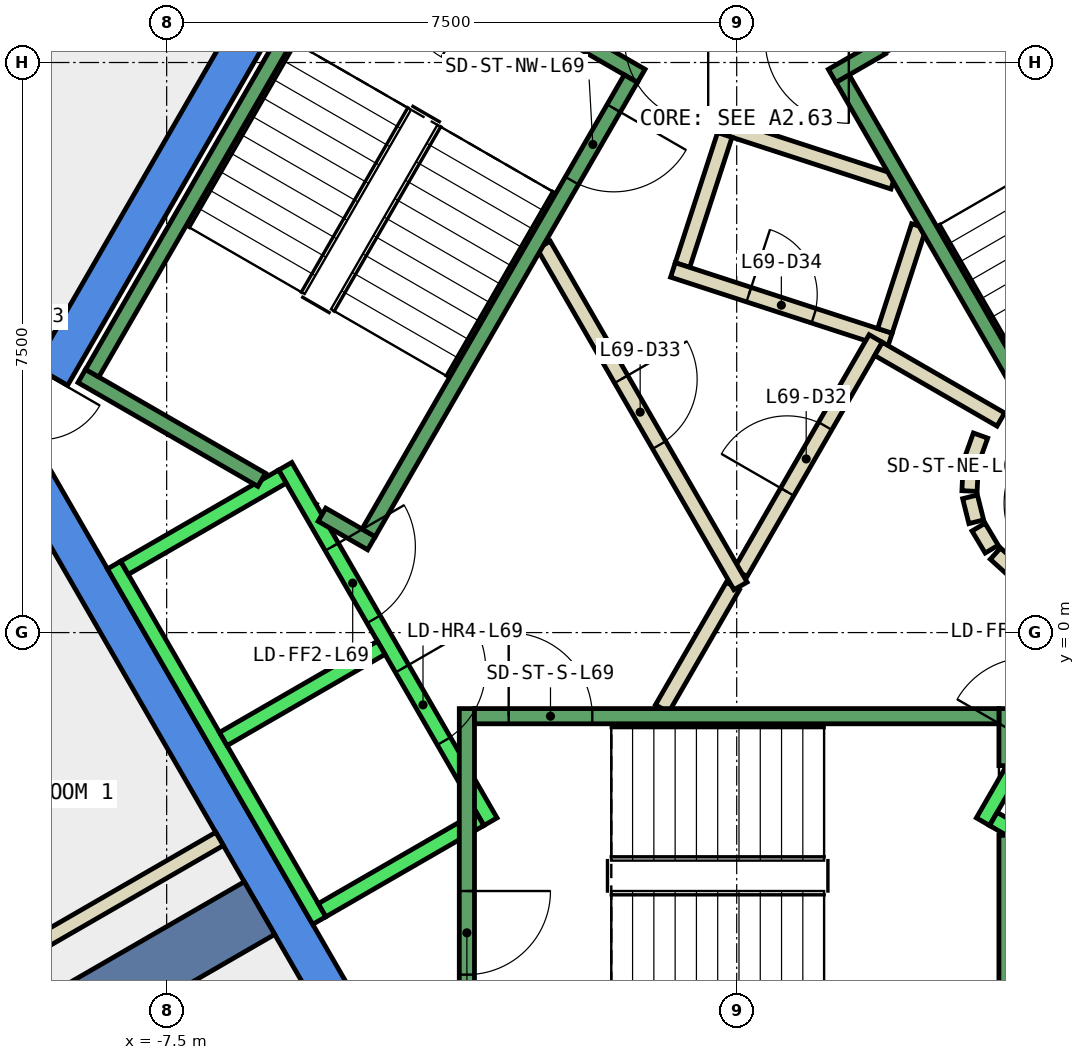
"""IFC4 building model, lengths in metres.
Left out: names, types, materials, properties, quantities, classifications, styles, units other than length and angle.
Written with IfcOpenShell. Run it as: python <this file> out.ifc"""

import sys

from ifc_helpers import new_model, si_unit, direction, frame, frame_2d, origin, place, context, subcontext, project, spatial, polyline, rectangle, outline, extrude, element, fill, save


model = new_model("IFC4")
c1 = context("Model", 3, precision=1e-05, world=origin(), true_north=direction((0.0, 1.0)))
c2 = subcontext(c1, "Body", "Model", "MODEL_VIEW")
j1 = project(units=[si_unit("LENGTHUNIT", "METRE"), si_unit("PLANEANGLEUNIT", "RADIAN")], contexts=[c1])
p1 = place(None, origin())
s1 = spatial("IfcSite", under=j1, at=p1, CompositionType="ELEMENT")
p2 = place(p1, origin())
s2 = spatial("IfcBuilding", under=s1, at=p2, CompositionType="ELEMENT")
p3 = place(p2, frame((0.0, 0.0, 297.2)))
s3 = spatial("IfcBuildingStorey", under=s2, at=p3, CompositionType="ELEMENT", Elevation=297.2)
p4 = place(p3, frame((0.0, 0.0, -0.34)))
e1 = element("IfcWall", 1, at=p4, inside=s3, PredefinedType="SHEAR", context=c2, shape_type="SweptSolid", body=[
    extrude(outline(polyline([(-9.236, 3.502), (-8.803, 3.253), (-4.619, 10.5), (-4.907, 11.0), (-9.236, 3.502)])), origin(), (0.0, 0.0, 1.0), 3.6),
])
p5 = place(p3, frame((0.0, 0.0, -0.34)))
e2 = element("IfcWall", 2, at=p5, inside=s3, PredefinedType="SHEAR", context=c2, shape_type="SweptSolid", body=[
    extrude(outline(polyline([(-9.815, 2.5), (-4.907, -6.0), (-4.619, -5.5), (-9.238, 2.5), (-9.815, 2.5)])), origin(), (0.0, 0.0, 1.0), 3.6),
])
p6 = place(p3, frame((-6.279, -3.625, -0.34), z_axis=(0.0, 0.0, 1.0), x_axis=(-0.866017533419, -0.500013631625, 0.0)))
e3 = element("IfcWall", 3, at=p6, inside=s3, PredefinedType="SHEAR", context=c2, shape_type="SweptSolid", body=[
    extrude(rectangle(XDim=9.0, YDim=0.8, at=frame_2d((4.5, 0.0))), origin(), (0.0, 0.0, 1.0), 3.6),
])
p7 = place(p3, frame((2.06, 5.931, 0.0), z_axis=(0.0, 0.0, 1.0), x_axis=(-0.95092855133, 0.309410552932, 0.0)))
e4 = element("IfcWall", 4, at=p7, inside=s3, PredefinedType="PARTITIONING", context=c2, shape_type="SweptSolid", body=[
    extrude(rectangle(XDim=2.399, YDim=0.2, at=frame_2d((1.199, 0.0))), origin(), (0.0, 0.0, 1.0), 3.26),
])
p8 = place(p3, frame((-0.157, 6.547, 0.0), z_axis=(0.0, 0.0, 1.0), x_axis=(-0.308813127339, -0.951122732555, 0.0)))
e5 = element("IfcWall", 5, at=p8, inside=s3, PredefinedType="PARTITIONING", context=c2, shape_type="SweptSolid", body=[
    extrude(rectangle(XDim=1.8, YDim=0.2, at=frame_2d((0.9, 0.0))), origin(), (0.0, 0.0, 1.0), 3.26),
])
p9 = place(p3, frame((-0.839, 4.771, 0.0), z_axis=(0.0, 0.0, 1.0), x_axis=(0.950961084355, -0.309310549515, 0.0)))
e6 = element("IfcWall", 6, at=p9, inside=s3, PredefinedType="PARTITIONING", context=c2, shape_type="SweptSolid", body=[
    extrude(rectangle(XDim=3.0, YDim=0.2, at=frame_2d((1.5, 0.0))), origin(), (0.0, 0.0, 1.0), 3.26),
])
p10 = place(p9, frame((1.05, 0.0, 0.0)))
e7 = element("IfcOpeningElement", 7, at=p10, cuts=e6, PredefinedType="OPENING", context=c2, shape_type="SweptSolid", body=[
    extrude(rectangle(XDim=0.9, YDim=2.1, at=frame_2d((0.45, 1.05))), frame((0.0, 0.11, 0.0), z_axis=(0.0, -1.0, 0.0), x_axis=(1.0, 0.0, 0.0)), (0.0, 0.0, 1.0), 0.22),
])
p11 = place(p3, frame((1.95, 3.97, 0.0), z_axis=(0.0, 0.0, 1.0), x_axis=(0.308583003896, 0.951197418892, 0.0)))
e8 = element("IfcWall", 8, at=p11, inside=s3, PredefinedType="PARTITIONING", context=c2, shape_type="SweptSolid", body=[
    extrude(rectangle(XDim=1.449, YDim=0.2, at=frame_2d((0.724, 0.0))), origin(), (0.0, 0.0, 1.0), 3.26),
])
p12 = place(p3, frame((-10.543, 6.174, 0.0), z_axis=(0.0, 0.0, 1.0), x_axis=(0.50008212199, 0.86597798544, 0.0)))
e9 = element("IfcWall", 9, at=p12, inside=s3, PredefinedType="PARTITIONING", context=c2, shape_type="SweptSolid", body=[
    extrude(rectangle(XDim=3.995, YDim=0.2, at=frame_2d((1.998, 0.0))), origin(), (0.0, 0.0, 1.0), 3.26),
])
p13 = place(p3, frame((-0.982, -1.0, 0.0), z_axis=(0.0, 0.0, 1.0), x_axis=(0.50024047865, 0.865886518847, 0.0)))
e10 = element("IfcWall", 10, at=p13, inside=s3, PredefinedType="PARTITIONING", context=c2, shape_type="SweptSolid", body=[
    extrude(rectangle(XDim=1.863, YDim=0.2, at=frame_2d((0.931, 0.0))), origin(), (0.0, 0.0, 1.0), 3.26),
])
p14 = place(p3, frame((0.05, 0.787, 0.0), z_axis=(0.0, 0.0, 1.0), x_axis=(0.499954076797, 0.866051915934, 0.0)))
e11 = element("IfcWall", 11, at=p14, inside=s3, PredefinedType="PARTITIONING", context=c2, shape_type="SweptSolid", body=[
    extrude(rectangle(XDim=3.558, YDim=0.2, at=frame_2d((1.779, 0.0))), origin(), (0.0, 0.0, 1.0), 3.26),
])
p15 = place(p14, frame((1.229, 0.0, 0.0)))
e12 = element("IfcOpeningElement", 12, at=p15, cuts=e11, PredefinedType="OPENING", context=c2, shape_type="SweptSolid", body=[
    extrude(rectangle(XDim=1.0, YDim=2.1, at=frame_2d((0.5, 1.05))), frame((0.0, 0.11, 0.0), z_axis=(0.0, -1.0, 0.0), x_axis=(1.0, 0.0, 0.0)), (0.0, 0.0, 1.0), 0.22),
])
p16 = place(p3, frame((1.866, 3.732, 0.0), z_axis=(0.0, 0.0, 1.0), x_axis=(0.866043361281, -0.499968895414, 0.0)))
e13 = element("IfcWall", 13, at=p16, inside=s3, PredefinedType="PARTITIONING", context=c2, shape_type="SweptSolid", body=[
    extrude(rectangle(XDim=1.858, YDim=0.2, at=frame_2d((0.929, 0.0))), origin(), (0.0, 0.0, 1.0), 3.26),
])
p17 = place(p3, frame((3.208, 2.592, 0.0), z_axis=(0.0, 0.0, 1.0), x_axis=(-0.337388820924, -0.941365382578, 0.0)))
e14 = element("IfcWall", 14, at=p17, inside=s3, PredefinedType="PARTITIONING", context=c2, shape_type="SweptSolid", body=[
    extrude(rectangle(XDim=0.338, YDim=0.2, at=frame_2d((0.169, 0.0))), origin(), (0.0, 0.0, 1.0), 3.26),
])
p18 = place(p3, frame((3.079, 2.199, 0.0), z_axis=(0.0, 0.0, 1.0), x_axis=(-0.047771483479, -0.998858290933, 0.0)))
e15 = element("IfcWall", 15, at=p18, inside=s3, PredefinedType="PARTITIONING", context=c2, shape_type="SweptSolid", body=[
    extrude(rectangle(XDim=0.337, YDim=0.2, at=frame_2d((0.169, 0.0))), origin(), (0.0, 0.0, 1.0), 3.26),
])
p19 = place(p3, frame((3.07, 1.786, 0.0), z_axis=(0.0, 0.0, 1.0), x_axis=(0.242705583207, -0.970099994784, 0.0)))
e16 = element("IfcWall", 16, at=p19, inside=s3, PredefinedType="PARTITIONING", context=c2, shape_type="SweptSolid", body=[
    extrude(rectangle(XDim=0.338, YDim=0.2, at=frame_2d((0.169, 0.0))), origin(), (0.0, 0.0, 1.0), 3.26),
])
for number, where, z_axis, x_axis in (
    (17, (3.182, 1.388, 0.0), (0.0, 0.0, 1.0), (0.512, -0.859, 0.0)),
    (18, (3.404, 1.039, 0.0), (0.0, 0.0, 1.0), (0.74, -0.672, 0.0)),
):
    element("IfcWall", number, at=place(p3, frame(where, z_axis=z_axis, x_axis=x_axis)), inside=s3, PredefinedType="PARTITIONING", context=c2, shape_type="SweptSolid", body=[
        extrude(rectangle(XDim=0.338, YDim=0.2, at=frame_2d((0.169, 0.0))), origin(), (0.0, 0.0, 1.0), 3.26),
    ])
p20 = place(p3, frame((-2.54, 5.1, 0.0), z_axis=(0.0, 0.0, 1.0), x_axis=(0.499925051871, -0.866068670783, 0.0)))
e19 = element("IfcWall", 19, at=p20, inside=s3, PredefinedType="PARTITIONING", context=c2, shape_type="SweptSolid", body=[
    extrude(rectangle(XDim=5.181, YDim=0.2, at=frame_2d((2.59, 0.0))), origin(), (0.0, 0.0, 1.0), 3.26),
])
p21 = place(p20, frame((2.04, 0.0, 0.0)))
e20 = element("IfcOpeningElement", 20, at=p21, cuts=e19, PredefinedType="OPENING", context=c2, shape_type="SweptSolid", body=[
    extrude(rectangle(XDim=1.0, YDim=2.1, at=frame_2d((0.5, 1.05))), frame((0.0, 0.11, 0.0), z_axis=(0.0, -1.0, 0.0), x_axis=(1.0, 0.0, 0.0)), (0.0, 0.0, 1.0), 0.22),
])
p22 = place(p3, frame((-6.804, -2.714, 0.0), z_axis=(0.0, 0.0, 1.0), x_axis=(-0.866057565063, -0.499944290893, 0.0)))
e21 = element("IfcWall", 21, at=p22, inside=s3, PredefinedType="PARTITIONING", context=c2, shape_type="SweptSolid", body=[
    extrude(rectangle(XDim=6.7, YDim=0.2, at=frame_2d((3.35, 0.0))), origin(), (0.0, 0.0, 1.0), 3.26),
])
p23 = place(p3, frame((-5.94, 2.188, 0.0), z_axis=(0.0, 0.0, 1.0), x_axis=(0.500034260056, -0.866005622828, 0.0)))
e22 = element("IfcWall", 22, at=p23, inside=s3, PredefinedType="STANDARD", context=c2, shape_type="SweptSolid", body=[
    extrude(rectangle(XDim=5.399, YDim=0.2, at=frame_2d((2.7, 0.0))), origin(), (0.0, 0.0, 1.0), 3.26),
])
p24 = place(p23, frame((3.075, 0.0, 0.0)))
e23 = element("IfcOpeningElement", 23, at=p24, cuts=e22, PredefinedType="OPENING", context=c2, shape_type="SweptSolid", body=[
    extrude(rectangle(XDim=1.1, YDim=2.1, at=frame_2d((0.55, 1.05))), frame((0.0, 0.11, 0.0), z_axis=(0.0, -1.0, 0.0), x_axis=(1.0, 0.0, 0.0)), (0.0, 0.0, 1.0), 0.22),
])
p25 = place(p23, frame((1.225, 0.0, 0.0)))
e24 = element("IfcOpeningElement", 24, at=p25, cuts=e22, PredefinedType="OPENING", context=c2, shape_type="SweptSolid", body=[
    extrude(rectangle(XDim=1.1, YDim=2.1, at=frame_2d((0.55, 1.05))), frame((0.0, 0.11, 0.0), z_axis=(0.0, -1.0, 0.0), x_axis=(1.0, 0.0, 0.0)), (0.0, 0.0, 1.0), 0.22),
])
p26 = place(p3, frame((-8.192, 0.888, 0.0), z_axis=(0.0, 0.0, 1.0), x_axis=(0.500034260056, -0.866005622828, 0.0)))
e25 = element("IfcWall", 25, at=p26, inside=s3, PredefinedType="STANDARD", context=c2, shape_type="SweptSolid", body=[
    extrude(rectangle(XDim=5.399, YDim=0.2, at=frame_2d((2.7, 0.0))), origin(), (0.0, 0.0, 1.0), 3.26),
])
for number, where, z_axis, x_axis in (
    (26, (-5.977, 2.052, 0.0), (0.0, 0.0, 1.0), (-0.866, -0.5, 0.0)),
    (27, (-4.677, -0.2, 0.0), (0.0, 0.0, 1.0), (-0.866, -0.5, 0.0)),
):
    element("IfcWall", number, at=place(p3, frame(where, z_axis=z_axis, x_axis=x_axis)), inside=s3, PredefinedType="STANDARD", context=c2, shape_type="SweptSolid", body=[
        extrude(rectangle(XDim=2.399, YDim=0.2, at=frame_2d((1.2, 0.0))), origin(), (0.0, 0.0, 1.0), 3.26),
    ])
p27 = place(p3, frame((-3.377, -2.452, 0.0), z_axis=(0.0, 0.0, 1.0), x_axis=(-0.865955154139, -0.50012165622, 0.0)))
e28 = element("IfcWall", 28, at=p27, inside=s3, PredefinedType="STANDARD", context=c2, shape_type="SweptSolid", body=[
    extrude(rectangle(XDim=2.4, YDim=0.2, at=frame_2d((1.2, 0.0))), origin(), (0.0, 0.0, 1.0), 3.26),
])
p28 = place(p3, frame((3.24, -2.488, 0.0), z_axis=(0.0, 0.0, 1.0), x_axis=(0.500034260056, 0.866005622828, 0.0)))
e29 = element("IfcWall", 29, at=p28, inside=s3, PredefinedType="STANDARD", context=c2, shape_type="SweptSolid", body=[
    extrude(rectangle(XDim=5.399, YDim=0.2, at=frame_2d((2.7, 0.0))), origin(), (0.0, 0.0, 1.0), 3.26),
])
p29 = place(p28, frame((3.225, 0.0, 0.0)))
e30 = element("IfcOpeningElement", 30, at=p29, cuts=e29, PredefinedType="OPENING", context=c2, shape_type="SweptSolid", body=[
    extrude(rectangle(XDim=1.1, YDim=2.1, at=frame_2d((0.55, 1.05))), frame((0.0, 0.11, 0.0), z_axis=(0.0, -1.0, 0.0), x_axis=(1.0, 0.0, 0.0)), (0.0, 0.0, 1.0), 0.22),
])
p30 = place(p28, frame((1.225, 0.0, 0.0)))
e31 = element("IfcOpeningElement", 31, at=p30, cuts=e29, PredefinedType="OPENING", context=c2, shape_type="SweptSolid", body=[
    extrude(rectangle(XDim=1.1, YDim=2.1, at=frame_2d((0.55, 1.05))), frame((0.0, 0.11, 0.0), z_axis=(0.0, -1.0, 0.0), x_axis=(1.0, 0.0, 0.0)), (0.0, 0.0, 1.0), 0.22),
])
p31 = place(p3, frame((3.377, -2.452, 0.0), z_axis=(0.0, 0.0, 1.0), x_axis=(0.865955154139, -0.50012165622, 0.0)))
e32 = element("IfcWall", 32, at=p31, inside=s3, PredefinedType="STANDARD", context=c2, shape_type="SweptSolid", body=[
    extrude(rectangle(XDim=2.4, YDim=0.2, at=frame_2d((1.2, 0.0))), origin(), (0.0, 0.0, 1.0), 3.26),
])
p32 = place(p3, frame((-3.55, -1.0, 0.0), z_axis=(0.0, 0.0, 1.0), x_axis=(0.0, -1.0, 0.0)))
e33 = element("IfcWall", 33, at=p32, inside=s3, PredefinedType="STANDARD", context=c2, shape_type="SweptSolid", body=[
    extrude(rectangle(XDim=4.4, YDim=0.2, at=frame_2d((2.2, 0.0))), origin(), (0.0, 0.0, 1.0), 3.26),
])
p33 = place(p32, frame((2.4, 0.0, 0.0)))
e34 = element("IfcOpeningElement", 34, at=p33, cuts=e33, PredefinedType="OPENING", context=c2, shape_type="SweptSolid", body=[
    extrude(rectangle(XDim=1.1, YDim=2.2, at=frame_2d((0.55, 1.1))), frame((0.0, 0.11, 0.0), z_axis=(0.0, -1.0, 0.0), x_axis=(1.0, 0.0, 0.0)), (0.0, 0.0, 1.0), 0.22),
])
p34 = place(p3, frame((3.55, -2.667, 0.0), z_axis=(0.0, 0.0, 1.0), x_axis=(0.0, -1.0, 0.0)))
e35 = element("IfcWall", 35, at=p34, inside=s3, PredefinedType="STANDARD", context=c2, shape_type="SweptSolid", body=[
    extrude(rectangle(XDim=2.733, YDim=0.2, at=frame_2d((1.366, 0.0))), origin(), (0.0, 0.0, 1.0), 3.26),
])
p35 = place(p3, frame((3.55, -1.0, 0.0), z_axis=(0.0, 0.0, 1.0), x_axis=(0.0, -1.0, 0.0)))
e36 = element("IfcWall", 36, at=p35, inside=s3, PredefinedType="STANDARD", context=c2, shape_type="SweptSolid", body=[
    extrude(rectangle(XDim=0.751, YDim=0.2, at=frame_2d((0.375, 0.0))), origin(), (0.0, 0.0, 1.0), 3.26),
])
p36 = place(p3, frame((-3.45, -1.1, 0.0), z_axis=(0.0, 0.0, 1.0), x_axis=(1.0, 0.0, 0.0)))
e37 = element("IfcWall", 37, at=p36, inside=s3, PredefinedType="STANDARD", context=c2, shape_type="SweptSolid", body=[
    extrude(rectangle(XDim=6.9, YDim=0.2, at=frame_2d((3.45, 0.0))), origin(), (0.0, 0.0, 1.0), 3.26),
])
p37 = place(p36, frame((0.45, 0.0, 0.0)))
e38 = element("IfcOpeningElement", 38, at=p37, cuts=e37, PredefinedType="OPENING", context=c2, shape_type="SweptSolid", body=[
    extrude(rectangle(XDim=1.1, YDim=2.2, at=frame_2d((0.55, 1.1))), frame((0.0, 0.11, 0.0), z_axis=(0.0, -1.0, 0.0), x_axis=(1.0, 0.0, 0.0)), (0.0, 0.0, 1.0), 0.22),
])
p38 = place(p3, frame((1.256, 7.324, 0.0), z_axis=(0.0, 0.0, 1.0), x_axis=(0.865915093549, 0.500191014278, 0.0)))
e39 = element("IfcWall", 39, at=p38, inside=s3, PredefinedType="STANDARD", context=c2, shape_type="SweptSolid", body=[
    extrude(rectangle(XDim=0.752, YDim=0.2, at=frame_2d((0.376, 0.0))), origin(), (0.0, 0.0, 1.0), 3.26),
])
p39 = place(p3, frame((4.843, 1.312, 0.0), z_axis=(0.0, 0.0, 1.0), x_axis=(-0.499963383562, 0.866046543262, 0.0)))
e40 = element("IfcWall", 40, at=p39, inside=s3, PredefinedType="STANDARD", context=c2, shape_type="SweptSolid", body=[
    extrude(rectangle(XDim=6.9, YDim=0.2, at=frame_2d((3.45, 0.0))), origin(), (0.0, 0.0, 1.0), 3.26),
])
p40 = place(p39, frame((0.45, 0.0, 0.0)))
e41 = element("IfcOpeningElement", 41, at=p40, cuts=e40, PredefinedType="OPENING", context=c2, shape_type="SweptSolid", body=[
    extrude(rectangle(XDim=1.1, YDim=2.2, at=frame_2d((0.55, 1.1))), frame((0.0, 0.11, 0.0), z_axis=(0.0, -1.0, 0.0), x_axis=(1.0, 0.0, 0.0)), (0.0, 0.0, 1.0), 0.22),
])
p41 = place(p3, frame((-1.256, 7.324, 0.0), z_axis=(0.0, 0.0, 1.0), x_axis=(-0.866046073146, 0.499964197906, 0.0)))
e42 = element("IfcWall", 42, at=p41, inside=s3, PredefinedType="STANDARD", context=c2, shape_type="SweptSolid", body=[
    extrude(rectangle(XDim=4.4, YDim=0.2, at=frame_2d((2.2, 0.0))), origin(), (0.0, 0.0, 1.0), 3.26),
])
p42 = place(p41, frame((2.4, 0.0, 0.0)))
e43 = element("IfcOpeningElement", 43, at=p42, cuts=e42, PredefinedType="OPENING", context=c2, shape_type="SweptSolid", body=[
    extrude(rectangle(XDim=1.1, YDim=2.2, at=frame_2d((0.55, 1.1))), frame((0.0, 0.11, 0.0), z_axis=(0.0, -1.0, 0.0), x_axis=(1.0, 0.0, 0.0)), (0.0, 0.0, 1.0), 0.22),
])
p43 = place(p3, frame((-6.25, 2.01, 0.0), z_axis=(0.0, 0.0, 1.0), x_axis=(-0.86611865017, 0.499838457731, 0.0)))
e44 = element("IfcWall", 44, at=p43, inside=s3, PredefinedType="STANDARD", context=c2, shape_type="SweptSolid", body=[
    extrude(rectangle(XDim=2.733, YDim=0.2, at=frame_2d((1.366, 0.0))), origin(), (0.0, 0.0, 1.0), 3.26),
])
p44 = place(p3, frame((-4.806, 1.176, 0.0), z_axis=(0.0, 0.0, 1.0), x_axis=(-0.866558586415, 0.499075361355, 0.0)))
e45 = element("IfcWall", 45, at=p44, inside=s3, PredefinedType="STANDARD", context=c2, shape_type="SweptSolid", body=[
    extrude(rectangle(XDim=0.751, YDim=0.2, at=frame_2d((0.376, 0.0))), origin(), (0.0, 0.0, 1.0), 3.26),
])
p45 = place(p3, frame((-1.393, 7.288, 0.0), z_axis=(0.0, 0.0, 1.0), x_axis=(-0.499963383562, -0.866046543262, 0.0)))
e46 = element("IfcWall", 46, at=p45, inside=s3, PredefinedType="STANDARD", context=c2, shape_type="SweptSolid", body=[
    extrude(rectangle(XDim=6.9, YDim=0.2, at=frame_2d((3.45, 0.0))), origin(), (0.0, 0.0, 1.0), 3.26),
])
p46 = place(p45, frame((0.45, 0.0, 0.0)))
e47 = element("IfcOpeningElement", 47, at=p46, cuts=e46, PredefinedType="OPENING", context=c2, shape_type="SweptSolid", body=[
    extrude(rectangle(XDim=1.1, YDim=2.2, at=frame_2d((0.55, 1.1))), frame((0.0, 0.11, 0.0), z_axis=(0.0, -1.0, 0.0), x_axis=(1.0, 0.0, 0.0)), (0.0, 0.0, 1.0), 0.22),
])
p47 = place(p3, frame((-5.03, 9.388, 0.0), z_axis=(0.0, 0.0, 1.0), x_axis=(-0.499978703459, -0.866037698999, 0.0)))
e48 = element("IfcWall", 48, at=p47, inside=s3, PredefinedType="STANDARD", context=c2, shape_type="SweptSolid", body=[
    extrude(rectangle(XDim=6.9, YDim=0.2, at=frame_2d((3.45, 0.0))), origin(), (0.0, 0.0, 1.0), 3.26),
])
p48 = place(p15, origin())
e49 = element("IfcDoor", 49, at=p48, inside=s3, OperationType="SINGLE_SWING_RIGHT", PredefinedType="DOOR", context=c2, shape_type="SweptSolid", body=[
    extrude(rectangle(XDim=1.0, YDim=2.1, at=frame_2d((0.5, 1.05))), frame((0.0, 0.025, 0.0), z_axis=(0.0, -1.0, 0.0), x_axis=(1.0, 0.0, 0.0)), (0.0, 0.0, 1.0), 0.05),
])
fill(e12, e49)
p49 = place(p21, origin())
e50 = element("IfcDoor", 50, at=p49, inside=s3, OperationType="SINGLE_SWING_RIGHT", PredefinedType="DOOR", context=c2, shape_type="SweptSolid", body=[
    extrude(rectangle(XDim=1.0, YDim=2.1, at=frame_2d((0.5, 1.05))), frame((0.0, 0.025, 0.0), z_axis=(0.0, -1.0, 0.0), x_axis=(1.0, 0.0, 0.0)), (0.0, 0.0, 1.0), 0.05),
])
fill(e20, e50)
p50 = place(p10, origin())
e51 = element("IfcDoor", 51, at=p50, inside=s3, OperationType="SINGLE_SWING_LEFT", PredefinedType="DOOR", context=c2, shape_type="SweptSolid", body=[
    extrude(rectangle(XDim=0.9, YDim=2.1, at=frame_2d((0.45, 1.05))), frame((0.0, 0.025, 0.0), z_axis=(0.0, -1.0, 0.0), x_axis=(1.0, 0.0, 0.0)), (0.0, 0.0, 1.0), 0.05),
])
fill(e7, e51)
p51 = place(p24, origin())
e52 = element("IfcDoor", 52, at=p51, inside=s3, OperationType="SLIDING_TO_LEFT", PredefinedType="DOOR", context=c2, shape_type="SweptSolid", body=[
    extrude(rectangle(XDim=1.1, YDim=2.1, at=frame_2d((0.55, 1.05))), frame((0.0, 0.025, 0.0), z_axis=(0.0, -1.0, 0.0), x_axis=(1.0, 0.0, 0.0)), (0.0, 0.0, 1.0), 0.05),
])
fill(e23, e52)
p52 = place(p25, origin())
e53 = element("IfcDoor", 53, at=p52, inside=s3, OperationType="SLIDING_TO_LEFT", PredefinedType="DOOR", context=c2, shape_type="SweptSolid", body=[
    extrude(rectangle(XDim=1.1, YDim=2.1, at=frame_2d((0.55, 1.05))), frame((0.0, 0.025, 0.0), z_axis=(0.0, -1.0, 0.0), x_axis=(1.0, 0.0, 0.0)), (0.0, 0.0, 1.0), 0.05),
])
fill(e24, e53)
p53 = place(p37, origin())
e54 = element("IfcDoor", 54, at=p53, inside=s3, OperationType="SINGLE_SWING_LEFT", PredefinedType="DOOR", context=c2, shape_type="SweptSolid", body=[
    extrude(rectangle(XDim=1.1, YDim=2.2, at=frame_2d((0.55, 1.1))), frame((0.0, 0.025, 0.0), z_axis=(0.0, -1.0, 0.0), x_axis=(1.0, 0.0, 0.0)), (0.0, 0.0, 1.0), 0.05),
])
fill(e38, e54)
p54 = place(p33, origin())
e55 = element("IfcDoor", 55, at=p54, inside=s3, OperationType="SINGLE_SWING_LEFT", PredefinedType="DOOR", context=c2, shape_type="SweptSolid", body=[
    extrude(rectangle(XDim=1.1, YDim=2.2, at=frame_2d((0.55, 1.1))), frame((0.0, 0.025, 0.0), z_axis=(0.0, -1.0, 0.0), x_axis=(1.0, 0.0, 0.0)), (0.0, 0.0, 1.0), 0.05),
])
fill(e34, e55)
p55 = place(p46, origin())
e56 = element("IfcDoor", 56, at=p55, inside=s3, OperationType="SINGLE_SWING_LEFT", PredefinedType="DOOR", context=c2, shape_type="SweptSolid", body=[
    extrude(rectangle(XDim=1.1, YDim=2.2, at=frame_2d((0.55, 1.1))), frame((0.0, 0.025, 0.0), z_axis=(0.0, -1.0, 0.0), x_axis=(1.0, 0.0, 0.0)), (0.0, 0.0, 1.0), 0.05),
])
fill(e47, e56)
save(model, sys.argv[1])
